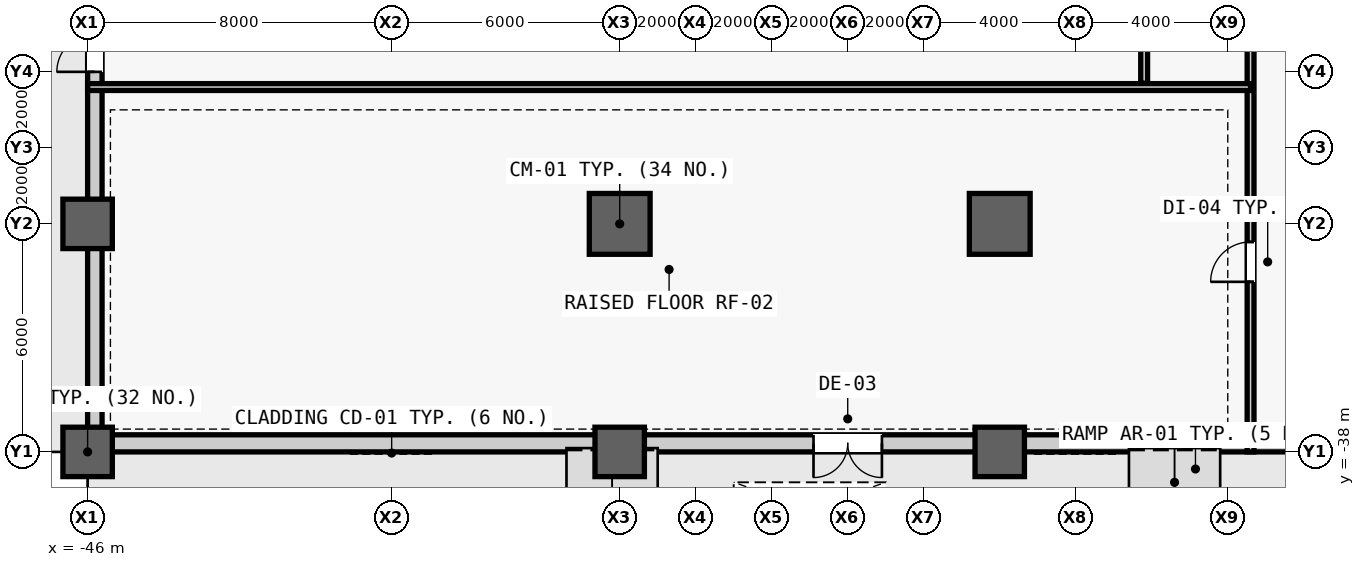
"""IFC4 building model, lengths in metres.
Left out: names, types, materials, properties, quantities, classifications, styles, units other than length and angle.
Written with IfcOpenShell. Run it as: python <this file> out.ifc"""

import sys

from ifc_helpers import new_model, si_unit, direction, frame, frame_2d, origin, origin_2d, place, context, subcontext, project, spatial, rectangle, extrude, source, transform, mapped, element, fill, save


model = new_model("IFC4")
c1 = context("Model", 3, precision=1e-05, world=origin(), true_north=direction((0.0, 1.0)))
c2 = subcontext(c1, "Body", "Model", "MODEL_VIEW")
j1 = project(units=[si_unit("LENGTHUNIT", "METRE"), si_unit("PLANEANGLEUNIT", "RADIAN")], contexts=[c1])
p1 = place(None, origin())
s1 = spatial("IfcSite", under=j1, at=p1, CompositionType="ELEMENT")
p2 = place(p1, origin())
s2 = spatial("IfcBuilding", under=s1, at=p2, CompositionType="ELEMENT")
p3 = place(p2, origin())
s3 = spatial("IfcBuildingStorey", under=s2, at=p3, CompositionType="ELEMENT", Elevation=0.0)
m1 = source(origin(), c2, "Body", "SweptSolid", [
    extrude(rectangle(XDim=1.3, YDim=1.3, at=origin_2d()), origin(), (0.0, 0.0, 1.0), 6.6),
])
for number, where, z_axis, x_axis in (
    (1, (-46.0, -38.0, 0.0), (0.0, 0.0, 1.0), (1.0, 0.0, 0.0)),
    (2, (-32.0, -38.0, 0.0), (0.0, 0.0, 1.0), (1.0, 0.0, 0.0)),
):
    element("IfcColumn", number, at=place(p3, frame(where, z_axis=z_axis, x_axis=x_axis)), inside=s3, PredefinedType="COLUMN", context=c2, shape_type="MappedRepresentation", body=[
        mapped(m1, transform((0.0, 0.0, 0.0), scale=1.0)),
    ])
m2 = source(origin(), c2, "Body", "SweptSolid", [
    extrude(rectangle(XDim=1.6, YDim=1.6, at=origin_2d()), origin(), (0.0, 0.0, 1.0), 6.6),
])
p4 = place(p3, frame((-32.0, -32.0, 0.0), z_axis=(0.0, 0.0, 1.0), x_axis=(1.0, 0.0, 0.0)))
e3 = element("IfcColumn", 3, at=p4, inside=s3, PredefinedType="COLUMN", context=c2, shape_type="MappedRepresentation", body=[
    mapped(m2, transform((0.0, 0.0, 0.0), scale=1.0)),
])
p5 = place(p3, frame((-22.0, -38.0, 0.0), z_axis=(0.0, 0.0, 1.0), x_axis=(1.0, 0.0, 0.0)))
e4 = element("IfcColumn", 4, at=p5, inside=s3, PredefinedType="COLUMN", context=c2, shape_type="MappedRepresentation", body=[
    mapped(m1, transform((0.0, 0.0, 0.0), scale=1.0)),
])
p6 = place(p3, frame((-22.0, -32.0, 0.0), z_axis=(0.0, 0.0, 1.0), x_axis=(1.0, 0.0, 0.0)))
e5 = element("IfcColumn", 5, at=p6, inside=s3, PredefinedType="COLUMN", context=c2, shape_type="MappedRepresentation", body=[
    mapped(m2, transform((0.0, 0.0, 0.0), scale=1.0)),
])
p7 = place(p3, frame((-46.0, -32.0, 0.0), z_axis=(0.0, 0.0, 1.0), x_axis=(1.0, 0.0, 0.0)))
e6 = element("IfcColumn", 6, at=p7, inside=s3, PredefinedType="COLUMN", context=c2, shape_type="MappedRepresentation", body=[
    mapped(m1, transform((0.0, 0.0, 0.0), scale=1.0)),
])
m3 = source(origin(), c2, "Body", "SweptSolid", [
    extrude(rectangle(XDim=92.0, YDim=0.45, at=frame_2d((46.0, 0.0))), origin(), (0.0, 0.0, 1.0), 4.48),
])
p8 = place(p3, frame((46.0, -37.775, 0.0), z_axis=(0.0, 0.0, 1.0), x_axis=(-1.0, 0.0, 0.0)))
e7 = element("IfcWall", 7, at=p8, inside=s3, PredefinedType="STANDARD", context=c2, shape_type="MappedRepresentation", body=[
    mapped(m3, transform((0.0, 0.0, 0.0), scale=1.0)),
])
m4 = source(origin(), c2, "Body", "SweptSolid", [
    extrude(rectangle(XDim=2.4, YDim=2.8, at=frame_2d((1.2, 1.4))), frame((0.0, 0.235, 0.0), z_axis=(0.0, -1.0, 0.0), x_axis=(1.0, 0.0, 0.0)), (0.0, 0.0, 1.0), 0.47),
])
p9 = place(p8, frame((48.8, 0.0, 0.0)))
e8 = element("IfcOpeningElement", 8, at=p9, cuts=e7, PredefinedType="OPENING", context=c2, shape_type="MappedRepresentation", body=[
    mapped(m4, transform((0.0, 0.0, 0.0), scale=1.0)),
])
p10 = place(p8, frame((40.8, 0.0, 0.0)))
e9 = element("IfcOpeningElement", 9, at=p10, cuts=e7, PredefinedType="OPENING", context=c2, shape_type="MappedRepresentation", body=[
    mapped(m4, transform((0.0, 0.0, 0.0), scale=1.0)),
])
m5 = source(origin(), c2, "Body", "SweptSolid", [
    extrude(rectangle(XDim=1.8, YDim=2.4, at=frame_2d((0.9, 1.2))), frame((0.0, 0.235, 0.0), z_axis=(0.0, -1.0, 0.0), x_axis=(1.0, 0.0, 0.0)), (0.0, 0.0, 1.0), 0.47),
])
p11 = place(p8, frame((71.1, 0.0, 0.0)))
e10 = element("IfcOpeningElement", 10, at=p11, cuts=e7, PredefinedType="OPENING", context=c2, shape_type="MappedRepresentation", body=[
    mapped(m5, transform((0.0, 0.0, 0.0), scale=1.0)),
])
p12 = place(p8, frame((19.1, 0.0, 0.0)))
e11 = element("IfcOpeningElement", 11, at=p12, cuts=e7, PredefinedType="OPENING", context=c2, shape_type="MappedRepresentation", body=[
    mapped(m5, transform((0.0, 0.0, 0.0), scale=1.0)),
])
m6 = source(origin(), c2, "Body", "SweptSolid", [
    extrude(rectangle(XDim=75.1, YDim=0.38, at=frame_2d((37.55, 0.0))), origin(), (0.0, 0.0, 1.0), 4.48),
])
p13 = place(p3, frame((-45.81, -37.55, 0.0), z_axis=(0.0, 0.0, 1.0), x_axis=(0.0, 1.0, 0.0)))
e12 = element("IfcWall", 12, at=p13, inside=s3, PredefinedType="STANDARD", context=c2, shape_type="MappedRepresentation", body=[
    mapped(m6, transform((0.0, 0.0, 0.0), scale=1.0)),
])
m7 = source(origin(), c2, "Body", "SweptSolid", [
    extrude(rectangle(XDim=2.0, YDim=2.3, at=frame_2d((1.0, 1.15))), frame((0.0, 0.2, 0.0), z_axis=(0.0, -1.0, 0.0), x_axis=(1.0, 0.0, 0.0)), (0.0, 0.0, 1.0), 0.4),
])
p14 = place(p13, frame((9.55, 0.0, 0.0)))
e13 = element("IfcOpeningElement", 13, at=p14, cuts=e12, PredefinedType="OPENING", context=c2, shape_type="MappedRepresentation", body=[
    mapped(m7, transform((0.0, 0.0, 0.0), scale=1.0)),
])
m8 = source(origin(), c2, "Body", "SweptSolid", [
    extrude(rectangle(XDim=1.05, YDim=2.25, at=frame_2d((0.525, 1.125))), frame((0.0, 0.2, 0.0), z_axis=(0.0, -1.0, 0.0), x_axis=(1.0, 0.0, 0.0)), (0.0, 0.0, 1.0), 0.4),
])
p15 = place(p13, frame((16.35, 0.0, 0.0)))
e14 = element("IfcOpeningElement", 14, at=p15, cuts=e12, PredefinedType="OPENING", context=c2, shape_type="MappedRepresentation", body=[
    mapped(m8, transform((0.0, 0.0, 0.0), scale=1.0)),
])
m9 = source(origin(), c2, "Body", "SweptSolid", [
    extrude(rectangle(XDim=4.2, YDim=4.2, at=frame_2d((2.1, 2.1))), frame((0.0, 0.2, 0.0), z_axis=(0.0, -1.0, 0.0), x_axis=(1.0, 0.0, 0.0)), (0.0, 0.0, 1.0), 0.4),
])
p16 = place(p13, frame((64.45, 0.0, 0.0)))
e15 = element("IfcOpeningElement", 15, at=p16, cuts=e12, PredefinedType="OPENING", context=c2, shape_type="MappedRepresentation", body=[
    mapped(m9, transform((0.0, 0.0, 0.0), scale=1.0)),
])
m10 = source(origin(), c2, "Body", "SweptSolid", [
    extrude(rectangle(XDim=2.4, YDim=2.6, at=frame_2d((1.2, 1.3))), frame((0.0, 0.2, 0.0), z_axis=(0.0, -1.0, 0.0), x_axis=(1.0, 0.0, 0.0)), (0.0, 0.0, 1.0), 0.4),
])
p17 = place(p13, frame((55.125, 0.0, 0.7)))
e16 = element("IfcOpeningElement", 16, at=p17, cuts=e12, PredefinedType="OPENING", context=c2, shape_type="MappedRepresentation", body=[
    mapped(m10, transform((0.0, 0.0, 0.0), scale=1.0)),
])
m11 = source(origin(), c2, "Body", "SweptSolid", [
    extrude(rectangle(XDim=11.8, YDim=0.18, at=frame_2d((5.9, 0.0))), origin(), (0.0, 0.0, 1.0), 6.28),
])
p18 = place(p3, frame((-15.4, -38.0, 0.0), z_axis=(0.0, 0.0, 1.0), x_axis=(0.0, 1.0, 0.0)))
e17 = element("IfcWall", 17, at=p18, inside=s3, PredefinedType="PARTITIONING", context=c2, shape_type="MappedRepresentation", body=[
    mapped(m11, transform((0.0, 0.0, 0.0), scale=1.0)),
])
m12 = source(origin(), c2, "Body", "SweptSolid", [
    extrude(rectangle(XDim=1.05, YDim=2.2, at=frame_2d((0.525, 1.1))), frame((0.0, 0.1, 0.0), z_axis=(0.0, -1.0, 0.0), x_axis=(1.0, 0.0, 0.0)), (0.0, 0.0, 1.0), 0.2),
])
p19 = place(p18, frame((4.475, 0.0, 0.0)))
e18 = element("IfcOpeningElement", 18, at=p19, cuts=e17, PredefinedType="OPENING", context=c2, shape_type="MappedRepresentation", body=[
    mapped(m12, transform((0.0, 0.0, 0.0), scale=1.0)),
])
m13 = source(origin(), c2, "Body", "SweptSolid", [
    extrude(rectangle(XDim=30.6, YDim=0.18, at=frame_2d((15.3, 0.0))), origin(), (0.0, 0.0, 1.0), 4.08),
])
p20 = place(p3, frame((-46.0, -28.4, 0.0), z_axis=(0.0, 0.0, 1.0), x_axis=(1.0, 0.0, 0.0)))
e19 = element("IfcWall", 19, at=p20, inside=s3, PredefinedType="PARTITIONING", context=c2, shape_type="MappedRepresentation", body=[
    mapped(m13, transform((0.0, 0.0, 0.0), scale=1.0)),
])
m14 = source(origin(), c2, "Body", "SweptSolid", [
    extrude(rectangle(XDim=4.5, YDim=0.18, at=frame_2d((2.25, 0.0))), origin(), (0.0, 0.0, 1.0), 6.28),
])
p21 = place(p3, frame((-18.2, -28.3, 0.0), z_axis=(0.0, 0.0, 1.0), x_axis=(0.0, 1.0, 0.0)))
e20 = element("IfcWall", 20, at=p21, inside=s3, PredefinedType="PARTITIONING", context=c2, shape_type="MappedRepresentation", body=[
    mapped(m14, transform((0.0, 0.0, 0.0), scale=1.0)),
])
m15 = source(origin(), c2, "Body", "SweptSolid", [
    extrude(rectangle(XDim=1.8, YDim=2.25, at=frame_2d((0.9, 1.125))), frame((0.0, 0.1, 0.0), z_axis=(0.0, -1.0, 0.0), x_axis=(1.0, 0.0, 0.0)), (0.0, 0.0, 1.0), 0.2),
])
p22 = place(p21, frame((1.4, 0.0, 0.0)))
e21 = element("IfcOpeningElement", 21, at=p22, cuts=e20, PredefinedType="OPENING", context=c2, shape_type="MappedRepresentation", body=[
    mapped(m15, transform((0.0, 0.0, 0.0), scale=1.0)),
])
m16 = source(origin(), c2, "Body", "SweptSolid", [
    extrude(rectangle(XDim=1.8, YDim=2.4, at=frame_2d((0.9, 1.2))), frame((0.0, 0.025, 0.0), z_axis=(0.0, -1.0, 0.0), x_axis=(1.0, 0.0, 0.0)), (0.0, 0.0, 1.0), 0.05),
])
p23 = place(p11, origin())
e22 = element("IfcDoor", 22, at=p23, inside=s3, OperationType="SINGLE_SWING_LEFT", PredefinedType="DOOR", context=c2, shape_type="MappedRepresentation", body=[
    mapped(m16, transform((0.0, 0.0, 0.0), scale=1.0)),
])
fill(e10, e22)
m17 = source(origin(), c2, "Body", "SweptSolid", [
    extrude(rectangle(XDim=2.0, YDim=2.3, at=frame_2d((1.0, 1.15))), frame((0.0, 0.025, 0.0), z_axis=(0.0, -1.0, 0.0), x_axis=(1.0, 0.0, 0.0)), (0.0, 0.0, 1.0), 0.05),
])
p24 = place(p14, origin())
e23 = element("IfcDoor", 23, at=p24, inside=s3, OperationType="SINGLE_SWING_RIGHT", PredefinedType="DOOR", context=c2, shape_type="MappedRepresentation", body=[
    mapped(m17, transform((0.0, 0.0, 0.0), scale=1.0)),
])
fill(e13, e23)
m18 = source(origin(), c2, "Body", "SweptSolid", [
    extrude(rectangle(XDim=1.05, YDim=2.2, at=frame_2d((0.525, 1.1))), frame((0.0, 0.025, 0.0), z_axis=(0.0, -1.0, 0.0), x_axis=(1.0, 0.0, 0.0)), (0.0, 0.0, 1.0), 0.05),
])
p25 = place(p19, origin())
e24 = element("IfcDoor", 24, at=p25, inside=s3, OperationType="SINGLE_SWING_LEFT", PredefinedType="DOOR", context=c2, shape_type="MappedRepresentation", body=[
    mapped(m18, transform((0.0, 0.0, 0.0), scale=1.0)),
])
fill(e18, e24)
save(model, sys.argv[1])
